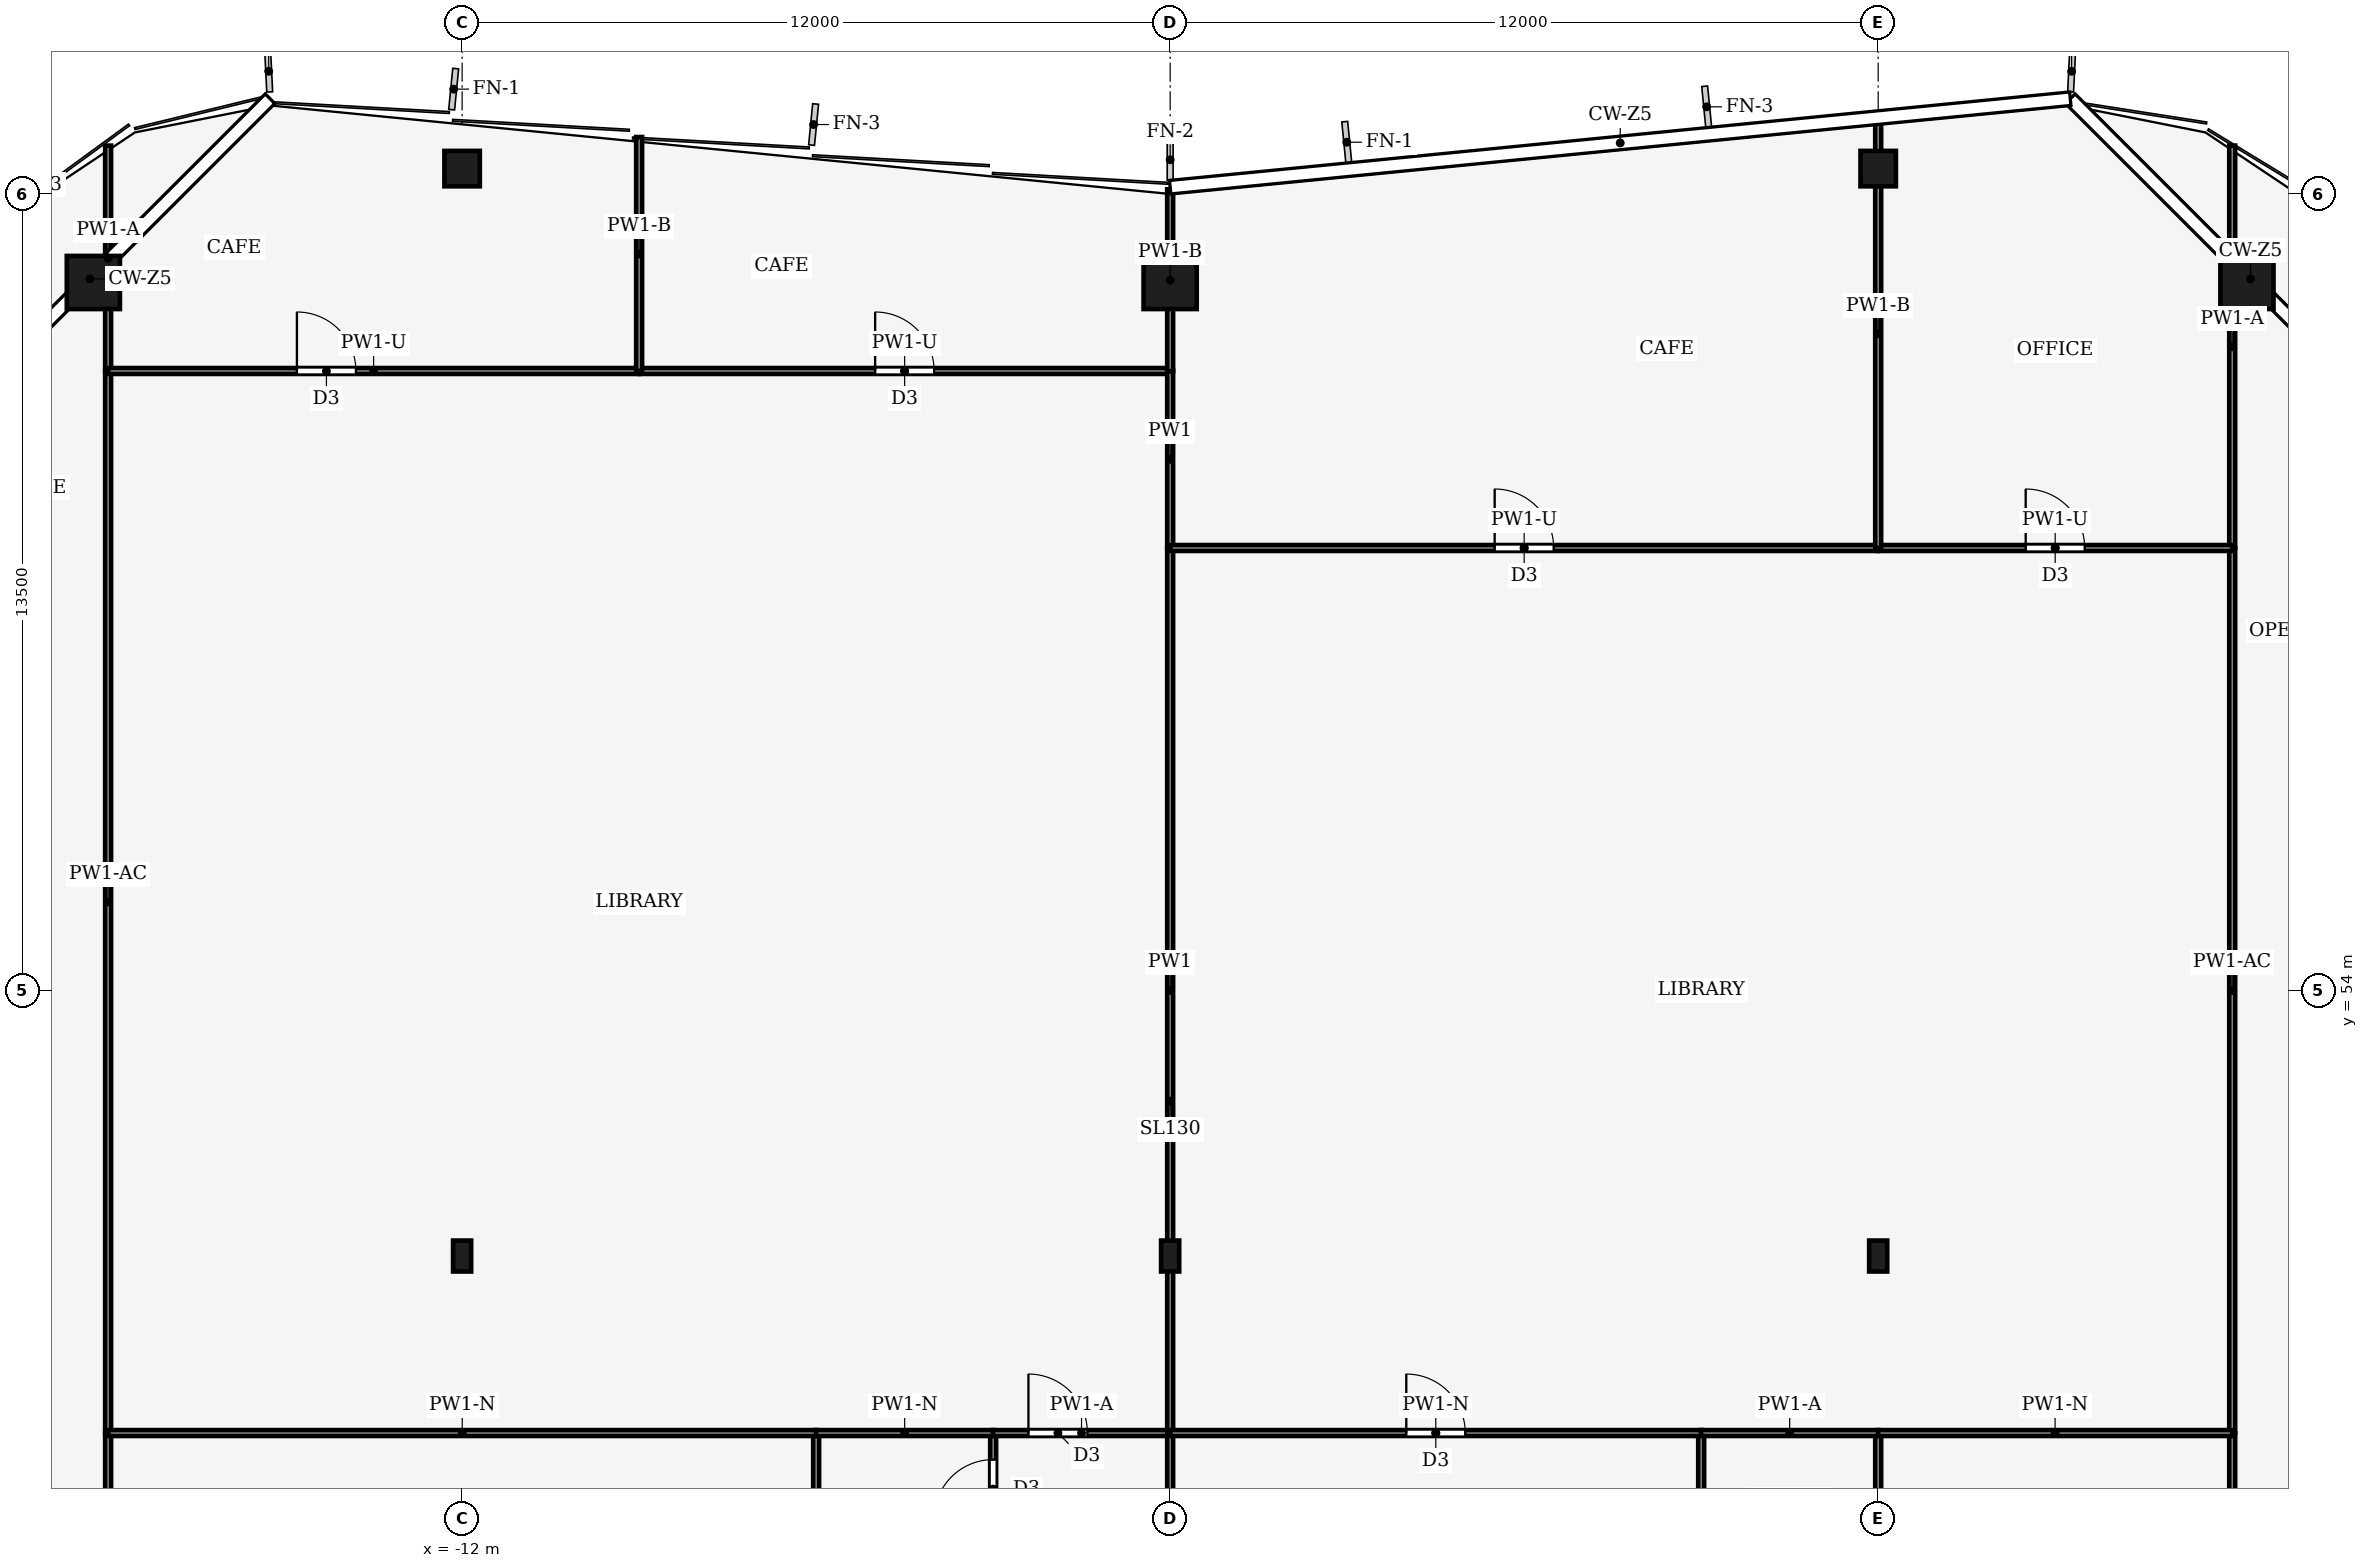
"""IFC4 building model, lengths in metres.
Left out: names, types, materials, properties, quantities, classifications, styles, units other than length and angle.
Written with IfcOpenShell. Run it as: python <this file> out.ifc"""

import sys

from ifc_helpers import new_model, si_unit, direction, frame, frame_2d, origin, origin_2d, place, context, subcontext, project, spatial, rectangle, hollow_rectangle, i_section, extrude, element, fill, save


model = new_model("IFC4")
c1 = context("Model", 3, precision=1e-05, world=origin(), true_north=direction((0.0, 1.0)))
c2 = subcontext(c1, "Body", "Model", "MODEL_VIEW")
j1 = project(units=[si_unit("LENGTHUNIT", "METRE"), si_unit("PLANEANGLEUNIT", "RADIAN")], contexts=[c1])
p1 = place(None, origin())
s1 = spatial("IfcSite", under=j1, at=p1, CompositionType="ELEMENT")
p2 = place(p1, origin())
s2 = spatial("IfcBuilding", under=s1, at=p2, CompositionType="ELEMENT")
p3 = place(p2, frame((0.0, 0.0, 289.0)))
s3 = spatial("IfcBuildingStorey", under=s2, at=p3, CompositionType="ELEMENT", Elevation=289.0)
for number, where, z_axis, x_axis in (
    (1, (-18.25, 66.0, 0.0), (0.0, 0.0, 1.0), (1.0, 0.0, 0.0)),
    (2, (0.0, 66.0, 0.0), (0.0, 0.0, 1.0), (1.0, 0.0, 0.0)),
    (3, (18.25, 66.0, 0.0), (0.0, 0.0, 1.0), (1.0, 0.0, 0.0)),
):
    element("IfcColumn", number, at=place(p3, frame(where, z_axis=z_axis, x_axis=x_axis)), inside=s3, PredefinedType="COLUMN", context=c2, shape_type="SweptSolid", body=[
        extrude(hollow_rectangle(XDim=0.9, YDim=0.9, WallThickness=0.04, at=origin_2d()), origin(), (0.0, 0.0, 1.0), 5.0),
    ])
for number, where, z_axis, x_axis in (
    (4, (-12.0, 67.93, 0.0), (0.0, 0.0, 1.0), (1.0, 0.0, 0.0)),
    (5, (12.0, 67.93, 0.0), (0.0, 0.0, 1.0), (1.0, 0.0, 0.0)),
):
    element("IfcColumn", number, at=place(p3, frame(where, z_axis=z_axis, x_axis=x_axis)), inside=s3, PredefinedType="COLUMN", context=c2, shape_type="SweptSolid", body=[
        extrude(hollow_rectangle(XDim=0.6, YDim=0.6, WallThickness=0.025, at=origin_2d()), origin(), (0.0, 0.0, 1.0), 5.0),
    ])
for number, where, z_axis, x_axis in (
    (6, (-12.0, 49.5, 0.0), (0.0, 0.0, 1.0), (1.0, 0.0, 0.0)),
    (7, (0.0, 49.5, 0.0), (0.0, 0.0, 1.0), (1.0, 0.0, 0.0)),
    (8, (12.0, 49.5, 0.0), (0.0, 0.0, 1.0), (1.0, 0.0, 0.0)),
):
    element("IfcColumn", number, at=place(p3, frame(where, z_axis=z_axis, x_axis=x_axis)), inside=s3, PredefinedType="COLUMN", context=c2, shape_type="SweptSolid", body=[
        extrude(i_section(OverallWidth=0.306, OverallDepth=0.524, WebThickness=0.012, FlangeThickness=0.04, FilletRadius=0.027, at=origin_2d()), origin(), (0.0, 0.0, 1.0), 5.0),
    ])
p4 = place(p3, frame((-18.0, 43.0, 0.0), z_axis=(0.0, 0.0, 1.0), x_axis=(0.0, 1.0, 0.0)))
e9 = element("IfcWall", 9, at=p4, inside=s3, PredefinedType="PARTITIONING", context=c2, shape_type="SweptSolid", body=[
    extrude(rectangle(XDim=3.5, YDim=0.1, at=frame_2d((1.75, 0.0))), origin(), (0.0, 0.0, 1.0), 4.87),
])
p5 = place(p3, frame((-18.0, 46.5, 0.0), z_axis=(0.0, 0.0, 1.0), x_axis=(0.0, 1.0, 0.0)))
e10 = element("IfcWall", 10, at=p5, inside=s3, PredefinedType="PARTITIONING", context=c2, shape_type="SweptSolid", body=[
    extrude(rectangle(XDim=18.0, YDim=0.1, at=frame_2d((9.0, 0.0))), origin(), (0.0, 0.0, 1.0), 4.35),
])
p6 = place(p3, frame((-18.0, 64.5, 0.0), z_axis=(0.0, 0.0, 1.0), x_axis=(0.0, 1.0, 0.0)))
e11 = element("IfcWall", 11, at=p6, inside=s3, PredefinedType="PARTITIONING", context=c2, shape_type="SweptSolid", body=[
    extrude(rectangle(XDim=3.82, YDim=0.1, at=frame_2d((1.91, 0.0))), origin(), (0.0, 0.0, 1.0), 4.87),
])
p7 = place(p3, frame((18.0, 46.5, 0.0), z_axis=(0.0, 0.0, 1.0), x_axis=(0.0, -1.0, 0.0)))
e12 = element("IfcWall", 12, at=p7, inside=s3, PredefinedType="PARTITIONING", context=c2, shape_type="SweptSolid", body=[
    extrude(rectangle(XDim=3.5, YDim=0.1, at=frame_2d((1.75, 0.0))), origin(), (0.0, 0.0, 1.0), 4.87),
])
p8 = place(p3, frame((18.0, 61.5, 0.0), z_axis=(0.0, 0.0, 1.0), x_axis=(0.0, -1.0, 0.0)))
e13 = element("IfcWall", 13, at=p8, inside=s3, PredefinedType="PARTITIONING", context=c2, shape_type="SweptSolid", body=[
    extrude(rectangle(XDim=15.0, YDim=0.1, at=frame_2d((7.5, 0.0))), origin(), (0.0, 0.0, 1.0), 4.35),
])
p9 = place(p3, frame((18.0, 68.32, 0.0), z_axis=(0.0, 0.0, 1.0), x_axis=(0.0, -1.0, 0.0)))
e14 = element("IfcWall", 14, at=p9, inside=s3, PredefinedType="PARTITIONING", context=c2, shape_type="SweptSolid", body=[
    extrude(rectangle(XDim=6.82, YDim=0.1, at=frame_2d((3.41, 0.0))), origin(), (0.0, 0.0, 1.0), 4.87),
])
p10 = place(p3, frame((-6.0, 43.0, 0.0), z_axis=(0.0, 0.0, 1.0), x_axis=(0.0, 1.0, 0.0)))
e15 = element("IfcWall", 15, at=p10, inside=s3, PredefinedType="PARTITIONING", context=c2, shape_type="SweptSolid", body=[
    extrude(rectangle(XDim=3.5, YDim=0.1, at=frame_2d((1.75, 0.0))), origin(), (0.0, 0.0, 1.0), 4.87),
])
p11 = place(p3, frame((-5.996, 46.5, 0.0), z_axis=(0.0, 0.0, 1.0), x_axis=(-1.0, 0.0, 0.0)))
e16 = element("IfcWall", 16, at=p11, inside=s3, PredefinedType="PARTITIONING", context=c2, shape_type="SweptSolid", body=[
    extrude(rectangle(XDim=12.004, YDim=0.1, at=frame_2d((6.002, 0.0))), origin(), (0.0, 0.0, 1.0), 4.39),
])
p12 = place(p3, frame((-3.0, 43.0, 0.0), z_axis=(0.0, 0.0, 1.0), x_axis=(0.0, 1.0, 0.0)))
e17 = element("IfcWall", 17, at=p12, inside=s3, PredefinedType="PARTITIONING", context=c2, shape_type="SweptSolid", body=[
    extrude(rectangle(XDim=3.5, YDim=0.1, at=frame_2d((1.75, 0.0))), origin(), (0.0, 0.0, 1.0), 4.87),
])
p13 = place(p12, frame((2.05, 0.0, 0.0)))
e18 = element("IfcOpeningElement", 18, at=p13, cuts=e17, PredefinedType="OPENING", context=c2, shape_type="SweptSolid", body=[
    extrude(rectangle(XDim=1.0, YDim=2.1, at=frame_2d((0.5, 1.05))), frame((0.0, 0.06, 0.0), z_axis=(0.0, -1.0, 0.0), x_axis=(1.0, 0.0, 0.0)), (0.0, 0.0, 1.0), 0.12),
])
p14 = place(p3, frame((-2.996, 46.5, 0.0), z_axis=(0.0, 0.0, 1.0), x_axis=(-1.0, 0.0, 0.0)))
e19 = element("IfcWall", 19, at=p14, inside=s3, PredefinedType="PARTITIONING", context=c2, shape_type="SweptSolid", body=[
    extrude(rectangle(XDim=3.008, YDim=0.1, at=frame_2d((1.504, 0.0))), origin(), (0.0, 0.0, 1.0), 4.39),
])
p15 = place(p3, frame((-3.004, 46.5, 0.0), z_axis=(0.0, 0.0, 1.0), x_axis=(1.0, 0.0, 0.0)))
e20 = element("IfcWall", 20, at=p15, inside=s3, PredefinedType="PARTITIONING", context=c2, shape_type="SweptSolid", body=[
    extrude(rectangle(XDim=3.004, YDim=0.1, at=frame_2d((1.502, 0.0))), origin(), (0.0, 0.0, 1.0), 4.87),
])
p16 = place(p15, frame((0.602, 0.0, 0.0)))
e21 = element("IfcOpeningElement", 21, at=p16, cuts=e20, PredefinedType="OPENING", context=c2, shape_type="SweptSolid", body=[
    extrude(rectangle(XDim=1.0, YDim=2.1, at=frame_2d((0.5, 1.05))), frame((0.0, 0.06, 0.0), z_axis=(0.0, -1.0, 0.0), x_axis=(1.0, 0.0, 0.0)), (0.0, 0.0, 1.0), 0.12),
])
p17 = place(p3, frame((0.0, 43.0, 0.0), z_axis=(0.0, 0.0, 1.0), x_axis=(0.0, 1.0, 0.0)))
e22 = element("IfcWall", 22, at=p17, inside=s3, PredefinedType="PARTITIONING", context=c2, shape_type="SweptSolid", body=[
    extrude(rectangle(XDim=3.5, YDim=0.1, at=frame_2d((1.75, 0.0))), origin(), (0.0, 0.0, 1.0), 4.39),
])
p18 = place(p3, frame((-18.0, 64.5, 0.0), z_axis=(0.0, 0.0, 1.0), x_axis=(1.0, 0.0, 0.0)))
e23 = element("IfcWall", 23, at=p18, inside=s3, PredefinedType="PARTITIONING", context=c2, shape_type="SweptSolid", body=[
    extrude(rectangle(XDim=9.0, YDim=0.1, at=frame_2d((4.5, 0.0))), origin(), (0.0, 0.0, 1.0), 4.24),
])
p19 = place(p18, frame((3.2, 0.0, 0.0)))
e24 = element("IfcOpeningElement", 24, at=p19, cuts=e23, PredefinedType="OPENING", context=c2, shape_type="SweptSolid", body=[
    extrude(rectangle(XDim=1.0, YDim=2.1, at=frame_2d((0.5, 1.05))), frame((0.0, 0.06, 0.0), z_axis=(0.0, -1.0, 0.0), x_axis=(1.0, 0.0, 0.0)), (0.0, 0.0, 1.0), 0.12),
])
p20 = place(p3, frame((-9.0, 64.5, 0.0), z_axis=(0.0, 0.0, 1.0), x_axis=(1.0, 0.0, 0.0)))
e25 = element("IfcWall", 25, at=p20, inside=s3, PredefinedType="PARTITIONING", context=c2, shape_type="SweptSolid", body=[
    extrude(rectangle(XDim=9.0, YDim=0.1, at=frame_2d((4.5, 0.0))), origin(), (0.0, 0.0, 1.0), 4.24),
])
p21 = place(p20, frame((4.0, 0.0, 0.0)))
e26 = element("IfcOpeningElement", 26, at=p21, cuts=e25, PredefinedType="OPENING", context=c2, shape_type="SweptSolid", body=[
    extrude(rectangle(XDim=1.0, YDim=2.1, at=frame_2d((0.5, 1.05))), frame((0.0, 0.06, 0.0), z_axis=(0.0, -1.0, 0.0), x_axis=(1.0, 0.0, 0.0)), (0.0, 0.0, 1.0), 0.12),
])
p22 = place(p3, frame((0.0, 46.5, 0.0), z_axis=(0.0, 0.0, 1.0), x_axis=(0.0, 1.0, 0.0)))
e27 = element("IfcWall", 27, at=p22, inside=s3, PredefinedType="PARTITIONING", context=c2, shape_type="SweptSolid", body=[
    extrude(rectangle(XDim=15.0, YDim=0.1, at=frame_2d((7.5, 0.0))), origin(), (0.0, 0.0, 1.0), 4.29),
])
p23 = place(p3, frame((0.0, 61.5, 0.0), z_axis=(0.0, 0.0, 1.0), x_axis=(0.0, 1.0, 0.0)))
e28 = element("IfcWall", 28, at=p23, inside=s3, PredefinedType="PARTITIONING", context=c2, shape_type="SweptSolid", body=[
    extrude(rectangle(XDim=3.004, YDim=0.1, at=frame_2d((1.502, 0.0))), origin(), (0.0, 0.0, 1.0), 4.29),
])
p24 = place(p3, frame((-9.0, 64.5, 0.0), z_axis=(0.0, 0.0, 1.0), x_axis=(0.0, 1.0, 0.0)))
e29 = element("IfcWall", 29, at=p24, inside=s3, PredefinedType="PARTITIONING", context=c2, shape_type="SweptSolid", body=[
    extrude(rectangle(XDim=3.965, YDim=0.1, at=frame_2d((1.982, 0.0))), origin(), (0.0, 0.0, 1.0), 4.04),
])
p25 = place(p3, frame((0.0, 64.496, 0.0), z_axis=(0.0, 0.0, 1.0), x_axis=(0.0, 1.0, 0.0)))
e30 = element("IfcWall", 30, at=p25, inside=s3, PredefinedType="PARTITIONING", context=c2, shape_type="SweptSolid", body=[
    extrude(rectangle(XDim=3.084, YDim=0.1, at=frame_2d((1.542, 0.0))), origin(), (0.0, 0.0, 1.0), 4.04),
])
p26 = place(p3, frame((9.0, 46.5, 0.0), z_axis=(0.0, 0.0, 1.0), x_axis=(0.0, -1.0, 0.0)))
e31 = element("IfcWall", 31, at=p26, inside=s3, PredefinedType="PARTITIONING", context=c2, shape_type="SweptSolid", body=[
    extrude(rectangle(XDim=3.5, YDim=0.1, at=frame_2d((1.75, 0.0))), origin(), (0.0, 0.0, 1.0), 4.87),
])
p27 = place(p26, frame((1.25, 0.0, 0.0)))
e32 = element("IfcOpeningElement", 32, at=p27, cuts=e31, PredefinedType="OPENING", context=c2, shape_type="SweptSolid", body=[
    extrude(rectangle(XDim=1.0, YDim=2.1, at=frame_2d((0.5, 1.05))), frame((0.0, 0.06, 0.0), z_axis=(0.0, -1.0, 0.0), x_axis=(1.0, 0.0, 0.0)), (0.0, 0.0, 1.0), 0.12),
])
p28 = place(p3, frame((0.0, 46.5, 0.0), z_axis=(0.0, 0.0, 1.0), x_axis=(1.0, 0.0, 0.0)))
e33 = element("IfcWall", 33, at=p28, inside=s3, PredefinedType="PARTITIONING", context=c2, shape_type="SweptSolid", body=[
    extrude(rectangle(XDim=9.004, YDim=0.1, at=frame_2d((4.502, 0.0))), origin(), (0.0, 0.0, 1.0), 4.39),
])
p29 = place(p28, frame((4.002, 0.0, 0.0)))
e34 = element("IfcOpeningElement", 34, at=p29, cuts=e33, PredefinedType="OPENING", context=c2, shape_type="SweptSolid", body=[
    extrude(rectangle(XDim=1.0, YDim=2.1, at=frame_2d((0.5, 1.05))), frame((0.0, 0.06, 0.0), z_axis=(0.0, -1.0, 0.0), x_axis=(1.0, 0.0, 0.0)), (0.0, 0.0, 1.0), 0.12),
])
p30 = place(p3, frame((12.0, 43.0, 0.0), z_axis=(0.0, 0.0, 1.0), x_axis=(0.0, 1.0, 0.0)))
e35 = element("IfcWall", 35, at=p30, inside=s3, PredefinedType="PARTITIONING", context=c2, shape_type="SweptSolid", body=[
    extrude(rectangle(XDim=3.5, YDim=0.1, at=frame_2d((1.75, 0.0))), origin(), (0.0, 0.0, 1.0), 4.39),
])
p31 = place(p3, frame((12.004, 46.5, 0.0), z_axis=(0.0, 0.0, 1.0), x_axis=(-1.0, 0.0, 0.0)))
e36 = element("IfcWall", 36, at=p31, inside=s3, PredefinedType="PARTITIONING", context=c2, shape_type="SweptSolid", body=[
    extrude(rectangle(XDim=3.008, YDim=0.1, at=frame_2d((1.504, 0.0))), origin(), (0.0, 0.0, 1.0), 4.87),
])
p32 = place(p3, frame((18.0, 46.5, 0.0), z_axis=(0.0, 0.0, 1.0), x_axis=(-1.0, 0.0, 0.0)))
e37 = element("IfcWall", 37, at=p32, inside=s3, PredefinedType="PARTITIONING", context=c2, shape_type="SweptSolid", body=[
    extrude(rectangle(XDim=6.004, YDim=0.1, at=frame_2d((3.002, 0.0))), origin(), (0.0, 0.0, 1.0), 4.39),
])
p33 = place(p3, frame((0.0, 61.5, 0.0), z_axis=(0.0, 0.0, 1.0), x_axis=(1.0, 0.0, 0.0)))
e38 = element("IfcWall", 38, at=p33, inside=s3, PredefinedType="PARTITIONING", context=c2, shape_type="SweptSolid", body=[
    extrude(rectangle(XDim=12.0, YDim=0.1, at=frame_2d((6.0, 0.0))), origin(), (0.0, 0.0, 1.0), 4.24),
])
p34 = place(p33, frame((5.5, 0.0, 0.0)))
e39 = element("IfcOpeningElement", 39, at=p34, cuts=e38, PredefinedType="OPENING", context=c2, shape_type="SweptSolid", body=[
    extrude(rectangle(XDim=1.0, YDim=2.1, at=frame_2d((0.5, 1.05))), frame((0.0, 0.06, 0.0), z_axis=(0.0, -1.0, 0.0), x_axis=(1.0, 0.0, 0.0)), (0.0, 0.0, 1.0), 0.12),
])
p35 = place(p3, frame((12.0, 61.5, 0.0), z_axis=(0.0, 0.0, 1.0), x_axis=(1.0, 0.0, 0.0)))
e40 = element("IfcWall", 40, at=p35, inside=s3, PredefinedType="PARTITIONING", context=c2, shape_type="SweptSolid", body=[
    extrude(rectangle(XDim=6.0, YDim=0.1, at=frame_2d((3.0, 0.0))), origin(), (0.0, 0.0, 1.0), 4.24),
])
p36 = place(p35, frame((2.5, 0.0, 0.0)))
e41 = element("IfcOpeningElement", 41, at=p36, cuts=e40, PredefinedType="OPENING", context=c2, shape_type="SweptSolid", body=[
    extrude(rectangle(XDim=1.0, YDim=2.1, at=frame_2d((0.5, 1.05))), frame((0.0, 0.06, 0.0), z_axis=(0.0, -1.0, 0.0), x_axis=(1.0, 0.0, 0.0)), (0.0, 0.0, 1.0), 0.12),
])
p37 = place(p3, frame((12.0, 61.5, 0.0), z_axis=(0.0, 0.0, 1.0), x_axis=(0.0, 1.0, 0.0)))
e42 = element("IfcWall", 42, at=p37, inside=s3, PredefinedType="PARTITIONING", context=c2, shape_type="SweptSolid", body=[
    extrude(rectangle(XDim=7.26, YDim=0.1, at=frame_2d((3.63, 0.0))), origin(), (0.0, 0.0, 1.0), 4.04),
])
p38 = place(p13, origin())
e43 = element("IfcDoor", 43, at=p38, inside=s3, OperationType="SINGLE_SWING_RIGHT", PredefinedType="DOOR", context=c2, shape_type="SweptSolid", body=[
    extrude(rectangle(XDim=1.0, YDim=2.1, at=frame_2d((0.5, 1.05))), frame((0.0, 0.025, 0.0), z_axis=(0.0, -1.0, 0.0), x_axis=(1.0, 0.0, 0.0)), (0.0, 0.0, 1.0), 0.05),
])
fill(e18, e43)
p39 = place(p16, origin())
e44 = element("IfcDoor", 44, at=p39, inside=s3, OperationType="SINGLE_SWING_LEFT", PredefinedType="DOOR", context=c2, shape_type="SweptSolid", body=[
    extrude(rectangle(XDim=1.0, YDim=2.1, at=frame_2d((0.5, 1.05))), frame((0.0, 0.025, 0.0), z_axis=(0.0, -1.0, 0.0), x_axis=(1.0, 0.0, 0.0)), (0.0, 0.0, 1.0), 0.05),
])
fill(e21, e44)
p40 = place(p19, origin())
e45 = element("IfcDoor", 45, at=p40, inside=s3, OperationType="SINGLE_SWING_LEFT", PredefinedType="DOOR", context=c2, shape_type="SweptSolid", body=[
    extrude(rectangle(XDim=1.0, YDim=2.1, at=frame_2d((0.5, 1.05))), frame((0.0, 0.025, 0.0), z_axis=(0.0, -1.0, 0.0), x_axis=(1.0, 0.0, 0.0)), (0.0, 0.0, 1.0), 0.05),
])
fill(e24, e45)
p41 = place(p21, origin())
e46 = element("IfcDoor", 46, at=p41, inside=s3, OperationType="SINGLE_SWING_LEFT", PredefinedType="DOOR", context=c2, shape_type="SweptSolid", body=[
    extrude(rectangle(XDim=1.0, YDim=2.1, at=frame_2d((0.5, 1.05))), frame((0.0, 0.025, 0.0), z_axis=(0.0, -1.0, 0.0), x_axis=(1.0, 0.0, 0.0)), (0.0, 0.0, 1.0), 0.05),
])
fill(e26, e46)
p42 = place(p29, origin())
e47 = element("IfcDoor", 47, at=p42, inside=s3, OperationType="SINGLE_SWING_LEFT", PredefinedType="DOOR", context=c2, shape_type="SweptSolid", body=[
    extrude(rectangle(XDim=1.0, YDim=2.1, at=frame_2d((0.5, 1.05))), frame((0.0, 0.025, 0.0), z_axis=(0.0, -1.0, 0.0), x_axis=(1.0, 0.0, 0.0)), (0.0, 0.0, 1.0), 0.05),
])
fill(e34, e47)
p43 = place(p34, origin())
e48 = element("IfcDoor", 48, at=p43, inside=s3, OperationType="SINGLE_SWING_RIGHT", PredefinedType="DOOR", context=c2, shape_type="SweptSolid", body=[
    extrude(rectangle(XDim=1.0, YDim=2.1, at=frame_2d((0.5, 1.05))), frame((0.0, 0.025, 0.0), z_axis=(0.0, -1.0, 0.0), x_axis=(1.0, 0.0, 0.0)), (0.0, 0.0, 1.0), 0.05),
])
fill(e39, e48)
p44 = place(p36, origin())
e49 = element("IfcDoor", 49, at=p44, inside=s3, OperationType="SINGLE_SWING_LEFT", PredefinedType="DOOR", context=c2, shape_type="SweptSolid", body=[
    extrude(rectangle(XDim=1.0, YDim=2.1, at=frame_2d((0.5, 1.05))), frame((0.0, 0.025, 0.0), z_axis=(0.0, -1.0, 0.0), x_axis=(1.0, 0.0, 0.0)), (0.0, 0.0, 1.0), 0.05),
])
fill(e41, e49)
save(model, sys.argv[1])
